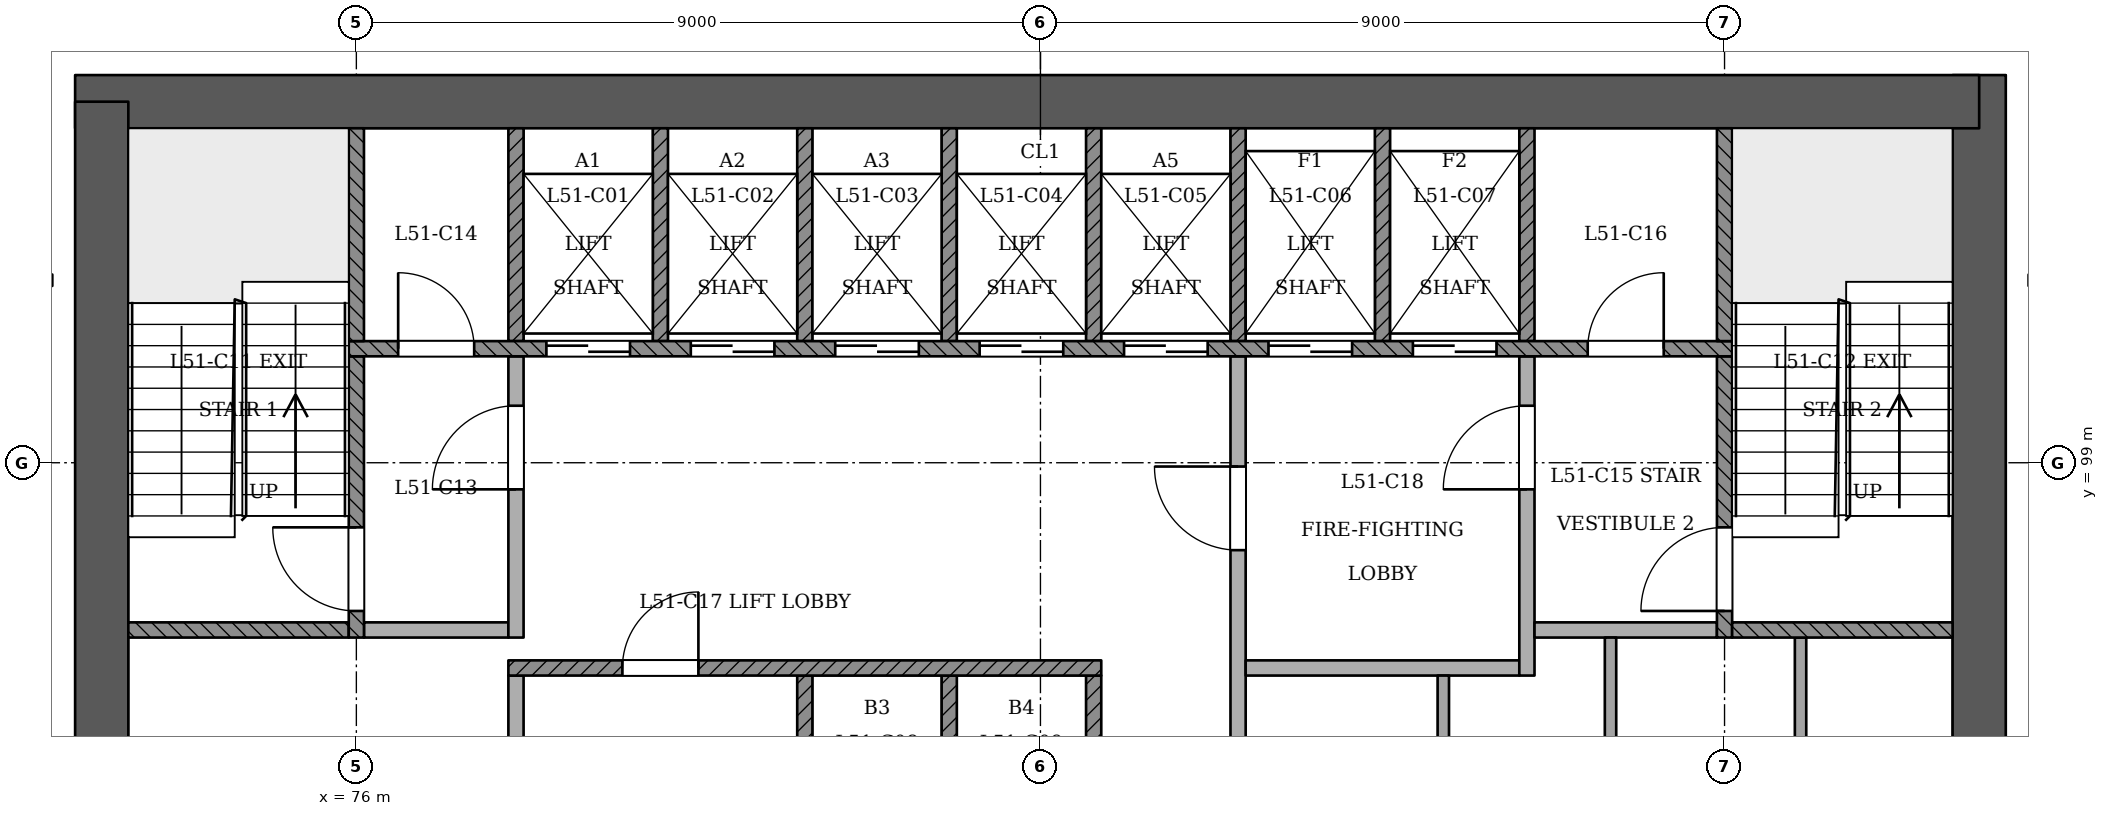
"""IFC4 building model, lengths in metres.
Left out: names, types, materials, properties, quantities, classifications, styles, units other than length and angle.
Written with IfcOpenShell. Run it as: python <this file> out.ifc"""

import sys

from ifc_helpers import new_model, si_unit, direction, frame, frame_2d, origin, place, context, subcontext, project, spatial, rectangle, extrude, element, fill, save


model = new_model("IFC4")
c1 = context("Model", 3, precision=1e-05, world=origin(), true_north=direction((0.0, 1.0)))
c2 = subcontext(c1, "Body", "Model", "MODEL_VIEW")
j1 = project(units=[si_unit("LENGTHUNIT", "METRE"), si_unit("PLANEANGLEUNIT", "RADIAN")], contexts=[c1])
p1 = place(None, origin())
s1 = spatial("IfcSite", under=j1, at=p1, CompositionType="ELEMENT")
p2 = place(p1, origin())
s2 = spatial("IfcBuilding", under=s1, at=p2, CompositionType="ELEMENT")
p3 = place(p2, frame((0.0, 0.0, 198.0)))
s3 = spatial("IfcBuildingStorey", under=s2, at=p3, CompositionType="ELEMENT", Elevation=198.0)
p4 = place(p3, frame((97.35, 93.05, 0.0), z_axis=(0.0, 0.0, 1.0), x_axis=(0.0, 1.0, 0.0)))
e1 = element("IfcWall", 1, at=p4, inside=s3, PredefinedType="SHEAR", context=c2, shape_type="SweptSolid", body=[
    extrude(rectangle(XDim=11.05, YDim=0.7, at=frame_2d((5.525, 0.0))), origin(), (0.0, 0.0, 1.0), 3.6),
])
p5 = place(p3, frame((97.35, 103.75, 0.0), z_axis=(0.0, 0.0, 1.0), x_axis=(-1.0, 0.0, 0.0)))
e2 = element("IfcWall", 2, at=p5, inside=s3, PredefinedType="SHEAR", context=c2, shape_type="SweptSolid", body=[
    extrude(rectangle(XDim=25.05, YDim=0.7, at=frame_2d((12.525, 0.0))), origin(), (0.0, 0.0, 1.0), 3.6),
])
p6 = place(p3, frame((72.65, 103.75, 0.0), z_axis=(0.0, 0.0, 1.0), x_axis=(0.0, -1.0, 0.0)))
e3 = element("IfcWall", 3, at=p6, inside=s3, PredefinedType="SHEAR", context=c2, shape_type="SweptSolid", body=[
    extrude(rectangle(XDim=11.05, YDim=0.7, at=frame_2d((5.525, 0.0))), origin(), (0.0, 0.0, 1.0), 3.6),
])
p7 = place(p3, frame((78.1, 93.4, 0.0), z_axis=(0.0, 0.0, 1.0), x_axis=(0.0, 1.0, 0.0)))
e4 = element("IfcWall", 4, at=p7, inside=s3, PredefinedType="PARTITIONING", context=c2, shape_type="SweptSolid", body=[
    extrude(rectangle(XDim=2.8, YDim=0.2, at=frame_2d((1.4, 0.0))), origin(), (0.0, 0.0, 1.0), 3.15),
])
for number, where, z_axis, x_axis in (
    (5, (81.9, 93.4, 0.0), (0.0, 0.0, 1.0), (0.0, 1.0, 0.0)),
    (6, (83.8, 93.4, 0.0), (0.0, 0.0, 1.0), (0.0, 1.0, 0.0)),
    (7, (85.7, 93.4, 0.0), (0.0, 0.0, 1.0), (0.0, 1.0, 0.0)),
):
    element("IfcWall", number, at=place(p3, frame(where, z_axis=z_axis, x_axis=x_axis)), inside=s3, PredefinedType="SOLIDWALL", context=c2, shape_type="SweptSolid", body=[
        extrude(rectangle(XDim=2.8, YDim=0.2, at=frame_2d((1.4, 0.0))), origin(), (0.0, 0.0, 1.0), 3.15),
    ])
p8 = place(p3, frame((87.6, 93.4, 0.0), z_axis=(0.0, 0.0, 1.0), x_axis=(0.0, 1.0, 0.0)))
e8 = element("IfcWall", 8, at=p8, inside=s3, PredefinedType="PARTITIONING", context=c2, shape_type="SweptSolid", body=[
    extrude(rectangle(XDim=7.0, YDim=0.2, at=frame_2d((3.5, 0.0))), origin(), (0.0, 0.0, 1.0), 3.15),
])
p9 = place(p8, frame((4.45, 0.0, 0.0)))
e9 = element("IfcOpeningElement", 9, at=p9, cuts=e8, PredefinedType="OPENING", context=c2, shape_type="SweptSolid", body=[
    extrude(rectangle(XDim=1.1, YDim=2.1, at=frame_2d((0.55, 1.05))), frame((0.0, 0.11, 0.0), z_axis=(0.0, -1.0, 0.0), x_axis=(1.0, 0.0, 0.0)), (0.0, 0.0, 1.0), 0.221),
])
p10 = place(p3, frame((90.3, 93.4, 0.0), z_axis=(0.0, 0.0, 1.0), x_axis=(0.0, 1.0, 0.0)))
e10 = element("IfcWall", 10, at=p10, inside=s3, PredefinedType="PARTITIONING", context=c2, shape_type="SweptSolid", body=[
    extrude(rectangle(XDim=2.8, YDim=0.15, at=frame_2d((1.4, 0.0))), origin(), (0.0, 0.0, 1.0), 3.15),
])
for number, where, z_axis, x_axis in (
    (11, (92.5, 93.4, 0.0), (0.0, 0.0, 1.0), (0.0, 1.0, 0.0)),
    (12, (95.0, 93.4, 0.0), (0.0, 0.0, 1.0), (0.0, 1.0, 0.0)),
):
    element("IfcWall", number, at=place(p3, frame(where, z_axis=z_axis, x_axis=x_axis)), inside=s3, PredefinedType="PARTITIONING", context=c2, shape_type="SweptSolid", body=[
        extrude(rectangle(XDim=3.3, YDim=0.15, at=frame_2d((1.65, 0.0))), origin(), (0.0, 0.0, 1.0), 3.15),
    ])
p11 = place(p3, frame((78.0, 96.3, 0.0), z_axis=(0.0, 0.0, 1.0), x_axis=(1.0, 0.0, 0.0)))
e13 = element("IfcWall", 13, at=p11, inside=s3, PredefinedType="SOLIDWALL", context=c2, shape_type="SweptSolid", body=[
    extrude(rectangle(XDim=7.8, YDim=0.2, at=frame_2d((3.9, 0.0))), origin(), (0.0, 0.0, 1.0), 3.15),
])
p12 = place(p11, frame((1.5, 0.0, 0.0)))
e14 = element("IfcOpeningElement", 14, at=p12, cuts=e13, PredefinedType="OPENING", context=c2, shape_type="SweptSolid", body=[
    extrude(rectangle(XDim=1.0, YDim=2.1, at=frame_2d((0.5, 1.05))), frame((0.0, 0.11, 0.0), z_axis=(0.0, -1.0, 0.0), x_axis=(1.0, 0.0, 0.0)), (0.0, 0.0, 1.0), 0.221),
])
p13 = place(p3, frame((87.7, 96.3, 0.0), z_axis=(0.0, 0.0, 1.0), x_axis=(1.0, 0.0, 0.0)))
e15 = element("IfcWall", 15, at=p13, inside=s3, PredefinedType="PARTITIONING", context=c2, shape_type="SweptSolid", body=[
    extrude(rectangle(XDim=3.6, YDim=0.2, at=frame_2d((1.8, 0.0))), origin(), (0.0, 0.0, 1.0), 3.15),
])
p14 = place(p3, frame((91.4, 96.2, 0.0), z_axis=(0.0, 0.0, 1.0), x_axis=(0.0, 1.0, 0.0)))
e16 = element("IfcWall", 16, at=p14, inside=s3, PredefinedType="PARTITIONING", context=c2, shape_type="SweptSolid", body=[
    extrude(rectangle(XDim=4.2, YDim=0.2, at=frame_2d((2.1, 0.0))), origin(), (0.0, 0.0, 1.0), 3.15),
])
p15 = place(p14, frame((2.45, 0.0, 0.0)))
e17 = element("IfcOpeningElement", 17, at=p15, cuts=e16, PredefinedType="OPENING", context=c2, shape_type="SweptSolid", body=[
    extrude(rectangle(XDim=1.1, YDim=2.1, at=frame_2d((0.55, 1.05))), frame((0.0, 0.11, 0.0), z_axis=(0.0, -1.0, 0.0), x_axis=(1.0, 0.0, 0.0)), (0.0, 0.0, 1.0), 0.221),
])
p16 = place(p3, frame((73.0, 96.8, 0.0), z_axis=(0.0, 0.0, 1.0), x_axis=(1.0, 0.0, 0.0)))
e18 = element("IfcWall", 18, at=p16, inside=s3, PredefinedType="SOLIDWALL", context=c2, shape_type="SweptSolid", body=[
    extrude(rectangle(XDim=2.9, YDim=0.2, at=frame_2d((1.45, 0.0))), origin(), (0.0, 0.0, 1.0), 3.15),
])
p17 = place(p3, frame((76.0, 96.7, 0.0), z_axis=(0.0, 0.0, 1.0), x_axis=(0.0, 1.0, 0.0)))
e19 = element("IfcWall", 19, at=p17, inside=s3, PredefinedType="SOLIDWALL", context=c2, shape_type="SweptSolid", body=[
    extrude(rectangle(XDim=3.7, YDim=0.2, at=frame_2d((1.85, 0.0))), origin(), (0.0, 0.0, 1.0), 3.15),
])
p18 = place(p17, frame((0.35, 0.0, 0.0)))
e20 = element("IfcOpeningElement", 20, at=p18, cuts=e19, PredefinedType="OPENING", context=c2, shape_type="SweptSolid", body=[
    extrude(rectangle(XDim=1.1, YDim=2.1, at=frame_2d((0.55, 1.05))), frame((0.0, 0.11, 0.0), z_axis=(0.0, -1.0, 0.0), x_axis=(1.0, 0.0, 0.0)), (0.0, 0.0, 1.0), 0.221),
])
p19 = place(p3, frame((76.1, 96.8, 0.0), z_axis=(0.0, 0.0, 1.0), x_axis=(1.0, 0.0, 0.0)))
e21 = element("IfcWall", 21, at=p19, inside=s3, PredefinedType="PARTITIONING", context=c2, shape_type="SweptSolid", body=[
    extrude(rectangle(XDim=1.9, YDim=0.2, at=frame_2d((0.95, 0.0))), origin(), (0.0, 0.0, 1.0), 3.15),
])
p20 = place(p3, frame((78.1, 96.7, 0.0), z_axis=(0.0, 0.0, 1.0), x_axis=(0.0, 1.0, 0.0)))
e22 = element("IfcWall", 22, at=p20, inside=s3, PredefinedType="PARTITIONING", context=c2, shape_type="SweptSolid", body=[
    extrude(rectangle(XDim=3.7, YDim=0.2, at=frame_2d((1.85, 0.0))), origin(), (0.0, 0.0, 1.0), 3.15),
])
p21 = place(p20, frame((1.95, 0.0, 0.0)))
e23 = element("IfcOpeningElement", 23, at=p21, cuts=e22, PredefinedType="OPENING", context=c2, shape_type="SweptSolid", body=[
    extrude(rectangle(XDim=1.1, YDim=2.1, at=frame_2d((0.55, 1.05))), frame((0.0, 0.11, 0.0), z_axis=(0.0, -1.0, 0.0), x_axis=(1.0, 0.0, 0.0)), (0.0, 0.0, 1.0), 0.221),
])
p22 = place(p3, frame((91.5, 96.8, 0.0), z_axis=(0.0, 0.0, 1.0), x_axis=(1.0, 0.0, 0.0)))
e24 = element("IfcWall", 24, at=p22, inside=s3, PredefinedType="PARTITIONING", context=c2, shape_type="SweptSolid", body=[
    extrude(rectangle(XDim=2.4, YDim=0.2, at=frame_2d((1.2, 0.0))), origin(), (0.0, 0.0, 1.0), 3.15),
])
p23 = place(p3, frame((94.0, 96.7, 0.0), z_axis=(0.0, 0.0, 1.0), x_axis=(0.0, 1.0, 0.0)))
e25 = element("IfcWall", 25, at=p23, inside=s3, PredefinedType="SOLIDWALL", context=c2, shape_type="SweptSolid", body=[
    extrude(rectangle(XDim=3.7, YDim=0.2, at=frame_2d((1.85, 0.0))), origin(), (0.0, 0.0, 1.0), 3.15),
])
p24 = place(p23, frame((0.35, 0.0, 0.0)))
e26 = element("IfcOpeningElement", 26, at=p24, cuts=e25, PredefinedType="OPENING", context=c2, shape_type="SweptSolid", body=[
    extrude(rectangle(XDim=1.1, YDim=2.1, at=frame_2d((0.55, 1.05))), frame((0.0, 0.11, 0.0), z_axis=(0.0, -1.0, 0.0), x_axis=(1.0, 0.0, 0.0)), (0.0, 0.0, 1.0), 0.221),
])
p25 = place(p3, frame((94.1, 96.8, 0.0), z_axis=(0.0, 0.0, 1.0), x_axis=(1.0, 0.0, 0.0)))
e27 = element("IfcWall", 27, at=p25, inside=s3, PredefinedType="SOLIDWALL", context=c2, shape_type="SweptSolid", body=[
    extrude(rectangle(XDim=2.9, YDim=0.2, at=frame_2d((1.45, 0.0))), origin(), (0.0, 0.0, 1.0), 3.15),
])
p26 = place(p3, frame((75.9, 100.5, 0.0), z_axis=(0.0, 0.0, 1.0), x_axis=(1.0, 0.0, 0.0)))
e28 = element("IfcWall", 28, at=p26, inside=s3, PredefinedType="SOLIDWALL", context=c2, shape_type="SweptSolid", body=[
    extrude(rectangle(XDim=18.2, YDim=0.2, at=frame_2d((9.1, 0.0))), origin(), (0.0, 0.0, 1.0), 3.15),
])
p27 = place(p26, frame((2.6, 0.0, 0.0)))
e29 = element("IfcOpeningElement", 29, at=p27, cuts=e28, PredefinedType="OPENING", context=c2, shape_type="SweptSolid", body=[
    extrude(rectangle(XDim=1.1, YDim=2.1, at=frame_2d((0.55, 1.05))), frame((0.0, 0.11, 0.0), z_axis=(0.0, -1.0, 0.0), x_axis=(1.0, 0.0, 0.0)), (0.0, 0.0, 1.0), 0.221),
])
p28 = place(p26, frame((4.5, 0.0, 0.0)))
e30 = element("IfcOpeningElement", 30, at=p28, cuts=e28, PredefinedType="OPENING", context=c2, shape_type="SweptSolid", body=[
    extrude(rectangle(XDim=1.1, YDim=2.1, at=frame_2d((0.55, 1.05))), frame((0.0, 0.11, 0.0), z_axis=(0.0, -1.0, 0.0), x_axis=(1.0, 0.0, 0.0)), (0.0, 0.0, 1.0), 0.221),
])
p29 = place(p26, frame((6.4, 0.0, 0.0)))
e31 = element("IfcOpeningElement", 31, at=p29, cuts=e28, PredefinedType="OPENING", context=c2, shape_type="SweptSolid", body=[
    extrude(rectangle(XDim=1.1, YDim=2.1, at=frame_2d((0.55, 1.05))), frame((0.0, 0.11, 0.0), z_axis=(0.0, -1.0, 0.0), x_axis=(1.0, 0.0, 0.0)), (0.0, 0.0, 1.0), 0.221),
])
p30 = place(p26, frame((8.3, 0.0, 0.0)))
e32 = element("IfcOpeningElement", 32, at=p30, cuts=e28, PredefinedType="OPENING", context=c2, shape_type="SweptSolid", body=[
    extrude(rectangle(XDim=1.1, YDim=2.1, at=frame_2d((0.55, 1.05))), frame((0.0, 0.11, 0.0), z_axis=(0.0, -1.0, 0.0), x_axis=(1.0, 0.0, 0.0)), (0.0, 0.0, 1.0), 0.221),
])
p31 = place(p26, frame((10.2, 0.0, 0.0)))
e33 = element("IfcOpeningElement", 33, at=p31, cuts=e28, PredefinedType="OPENING", context=c2, shape_type="SweptSolid", body=[
    extrude(rectangle(XDim=1.1, YDim=2.1, at=frame_2d((0.55, 1.05))), frame((0.0, 0.11, 0.0), z_axis=(0.0, -1.0, 0.0), x_axis=(1.0, 0.0, 0.0)), (0.0, 0.0, 1.0), 0.221),
])
p32 = place(p26, frame((12.1, 0.0, 0.0)))
e34 = element("IfcOpeningElement", 34, at=p32, cuts=e28, PredefinedType="OPENING", context=c2, shape_type="SweptSolid", body=[
    extrude(rectangle(XDim=1.1, YDim=2.1, at=frame_2d((0.55, 1.05))), frame((0.0, 0.11, 0.0), z_axis=(0.0, -1.0, 0.0), x_axis=(1.0, 0.0, 0.0)), (0.0, 0.0, 1.0), 0.221),
])
p33 = place(p26, frame((14.0, 0.0, 0.0)))
e35 = element("IfcOpeningElement", 35, at=p33, cuts=e28, PredefinedType="OPENING", context=c2, shape_type="SweptSolid", body=[
    extrude(rectangle(XDim=1.1, YDim=2.1, at=frame_2d((0.55, 1.05))), frame((0.0, 0.11, 0.0), z_axis=(0.0, -1.0, 0.0), x_axis=(1.0, 0.0, 0.0)), (0.0, 0.0, 1.0), 0.221),
])
p34 = place(p26, frame((0.65, 0.0, 0.0)))
e36 = element("IfcOpeningElement", 36, at=p34, cuts=e28, PredefinedType="OPENING", context=c2, shape_type="SweptSolid", body=[
    extrude(rectangle(XDim=1.0, YDim=2.1, at=frame_2d((0.5, 1.05))), frame((0.0, 0.11, 0.0), z_axis=(0.0, -1.0, 0.0), x_axis=(1.0, 0.0, 0.0)), (0.0, 0.0, 1.0), 0.221),
])
p35 = place(p26, frame((16.3, 0.0, 0.0)))
e37 = element("IfcOpeningElement", 37, at=p35, cuts=e28, PredefinedType="OPENING", context=c2, shape_type="SweptSolid", body=[
    extrude(rectangle(XDim=1.0, YDim=2.1, at=frame_2d((0.5, 1.05))), frame((0.0, 0.11, 0.0), z_axis=(0.0, -1.0, 0.0), x_axis=(1.0, 0.0, 0.0)), (0.0, 0.0, 1.0), 0.221),
])
for number, where, z_axis, x_axis in (
    (38, (76.0, 100.6, 0.0), (0.0, 0.0, 1.0), (0.0, 1.0, 0.0)),
    (39, (78.1, 100.6, 0.0), (0.0, 0.0, 1.0), (0.0, 1.0, 0.0)),
    (40, (80.0, 100.6, 0.0), (0.0, 0.0, 1.0), (0.0, 1.0, 0.0)),
    (41, (81.9, 100.6, 0.0), (0.0, 0.0, 1.0), (0.0, 1.0, 0.0)),
    (42, (83.8, 100.6, 0.0), (0.0, 0.0, 1.0), (0.0, 1.0, 0.0)),
    (43, (85.7, 100.6, 0.0), (0.0, 0.0, 1.0), (0.0, 1.0, 0.0)),
    (44, (87.6, 100.6, 0.0), (0.0, 0.0, 1.0), (0.0, 1.0, 0.0)),
    (45, (89.5, 100.6, 0.0), (0.0, 0.0, 1.0), (0.0, 1.0, 0.0)),
    (46, (91.4, 100.6, 0.0), (0.0, 0.0, 1.0), (0.0, 1.0, 0.0)),
    (47, (94.0, 100.6, 0.0), (0.0, 0.0, 1.0), (0.0, 1.0, 0.0)),
):
    element("IfcWall", number, at=place(p3, frame(where, z_axis=z_axis, x_axis=x_axis)), inside=s3, PredefinedType="SOLIDWALL", context=c2, shape_type="SweptSolid", body=[
        extrude(rectangle(XDim=2.8, YDim=0.2, at=frame_2d((1.4, 0.0))), origin(), (0.0, 0.0, 1.0), 3.15),
    ])
p36 = place(p27, origin())
e48 = element("IfcDoor", 48, at=p36, inside=s3, OperationType="SLIDING_TO_RIGHT", PredefinedType="NOTDEFINED", context=c2, shape_type="SweptSolid", body=[
    extrude(rectangle(XDim=1.1, YDim=2.1, at=frame_2d((0.55, 1.05))), frame((0.0, 0.025, 0.0), z_axis=(0.0, -1.0, 0.0), x_axis=(1.0, 0.0, 0.0)), (0.0, 0.0, 1.0), 0.05),
])
fill(e29, e48)
p37 = place(p28, origin())
e49 = element("IfcDoor", 49, at=p37, inside=s3, OperationType="SLIDING_TO_LEFT", PredefinedType="NOTDEFINED", context=c2, shape_type="SweptSolid", body=[
    extrude(rectangle(XDim=1.1, YDim=2.1, at=frame_2d((0.55, 1.05))), frame((0.0, 0.025, 0.0), z_axis=(0.0, -1.0, 0.0), x_axis=(1.0, 0.0, 0.0)), (0.0, 0.0, 1.0), 0.05),
])
fill(e30, e49)
p38 = place(p29, origin())
e50 = element("IfcDoor", 50, at=p38, inside=s3, OperationType="SLIDING_TO_RIGHT", PredefinedType="NOTDEFINED", context=c2, shape_type="SweptSolid", body=[
    extrude(rectangle(XDim=1.1, YDim=2.1, at=frame_2d((0.55, 1.05))), frame((0.0, 0.025, 0.0), z_axis=(0.0, -1.0, 0.0), x_axis=(1.0, 0.0, 0.0)), (0.0, 0.0, 1.0), 0.05),
])
fill(e31, e50)
p39 = place(p30, origin())
e51 = element("IfcDoor", 51, at=p39, inside=s3, OperationType="SLIDING_TO_LEFT", PredefinedType="NOTDEFINED", context=c2, shape_type="SweptSolid", body=[
    extrude(rectangle(XDim=1.1, YDim=2.1, at=frame_2d((0.55, 1.05))), frame((0.0, 0.025, 0.0), z_axis=(0.0, -1.0, 0.0), x_axis=(1.0, 0.0, 0.0)), (0.0, 0.0, 1.0), 0.05),
])
fill(e32, e51)
p40 = place(p31, origin())
e52 = element("IfcDoor", 52, at=p40, inside=s3, OperationType="SLIDING_TO_RIGHT", PredefinedType="NOTDEFINED", context=c2, shape_type="SweptSolid", body=[
    extrude(rectangle(XDim=1.1, YDim=2.1, at=frame_2d((0.55, 1.05))), frame((0.0, 0.025, 0.0), z_axis=(0.0, -1.0, 0.0), x_axis=(1.0, 0.0, 0.0)), (0.0, 0.0, 1.0), 0.05),
])
fill(e33, e52)
p41 = place(p32, origin())
e53 = element("IfcDoor", 53, at=p41, inside=s3, OperationType="SLIDING_TO_RIGHT", PredefinedType="NOTDEFINED", context=c2, shape_type="SweptSolid", body=[
    extrude(rectangle(XDim=1.1, YDim=2.1, at=frame_2d((0.55, 1.05))), frame((0.0, 0.025, 0.0), z_axis=(0.0, -1.0, 0.0), x_axis=(1.0, 0.0, 0.0)), (0.0, 0.0, 1.0), 0.05),
])
fill(e34, e53)
p42 = place(p33, origin())
e54 = element("IfcDoor", 54, at=p42, inside=s3, OperationType="SLIDING_TO_LEFT", PredefinedType="NOTDEFINED", context=c2, shape_type="SweptSolid", body=[
    extrude(rectangle(XDim=1.1, YDim=2.1, at=frame_2d((0.55, 1.05))), frame((0.0, 0.025, 0.0), z_axis=(0.0, -1.0, 0.0), x_axis=(1.0, 0.0, 0.0)), (0.0, 0.0, 1.0), 0.05),
])
fill(e35, e54)
p43 = place(p18, origin())
e55 = element("IfcDoor", 55, at=p43, inside=s3, OperationType="SINGLE_SWING_RIGHT", PredefinedType="NOTDEFINED", context=c2, shape_type="SweptSolid", body=[
    extrude(rectangle(XDim=1.1, YDim=2.1, at=frame_2d((0.55, 1.05))), frame((0.0, 0.025, 0.0), z_axis=(0.0, -1.0, 0.0), x_axis=(1.0, 0.0, 0.0)), (0.0, 0.0, 1.0), 0.05),
])
fill(e20, e55)
p44 = place(p24, origin())
e56 = element("IfcDoor", 56, at=p44, inside=s3, OperationType="SINGLE_SWING_LEFT", PredefinedType="NOTDEFINED", context=c2, shape_type="SweptSolid", body=[
    extrude(rectangle(XDim=1.1, YDim=2.1, at=frame_2d((0.55, 1.05))), frame((0.0, 0.025, 0.0), z_axis=(0.0, -1.0, 0.0), x_axis=(1.0, 0.0, 0.0)), (0.0, 0.0, 1.0), 0.05),
])
fill(e26, e56)
p45 = place(p21, origin())
e57 = element("IfcDoor", 57, at=p45, inside=s3, OperationType="SINGLE_SWING_LEFT", PredefinedType="NOTDEFINED", context=c2, shape_type="SweptSolid", body=[
    extrude(rectangle(XDim=1.1, YDim=2.1, at=frame_2d((0.55, 1.05))), frame((0.0, 0.025, 0.0), z_axis=(0.0, -1.0, 0.0), x_axis=(1.0, 0.0, 0.0)), (0.0, 0.0, 1.0), 0.05),
])
fill(e23, e57)
p46 = place(p9, origin())
e58 = element("IfcDoor", 58, at=p46, inside=s3, OperationType="SINGLE_SWING_RIGHT", PredefinedType="NOTDEFINED", context=c2, shape_type="SweptSolid", body=[
    extrude(rectangle(XDim=1.1, YDim=2.1, at=frame_2d((0.55, 1.05))), frame((0.0, 0.025, 0.0), z_axis=(0.0, -1.0, 0.0), x_axis=(1.0, 0.0, 0.0)), (0.0, 0.0, 1.0), 0.05),
])
fill(e9, e58)
p47 = place(p15, origin())
e59 = element("IfcDoor", 59, at=p47, inside=s3, OperationType="SINGLE_SWING_LEFT", PredefinedType="NOTDEFINED", context=c2, shape_type="SweptSolid", body=[
    extrude(rectangle(XDim=1.1, YDim=2.1, at=frame_2d((0.55, 1.05))), frame((0.0, 0.025, 0.0), z_axis=(0.0, -1.0, 0.0), x_axis=(1.0, 0.0, 0.0)), (0.0, 0.0, 1.0), 0.05),
])
fill(e17, e59)
p48 = place(p34, origin())
e60 = element("IfcDoor", 60, at=p48, inside=s3, OperationType="SINGLE_SWING_LEFT", PredefinedType="NOTDEFINED", context=c2, shape_type="SweptSolid", body=[
    extrude(rectangle(XDim=1.0, YDim=2.1, at=frame_2d((0.5, 1.05))), frame((0.0, 0.025, 0.0), z_axis=(0.0, -1.0, 0.0), x_axis=(1.0, 0.0, 0.0)), (0.0, 0.0, 1.0), 0.05),
])
fill(e36, e60)
p49 = place(p35, origin())
e61 = element("IfcDoor", 61, at=p49, inside=s3, OperationType="SINGLE_SWING_RIGHT", PredefinedType="NOTDEFINED", context=c2, shape_type="SweptSolid", body=[
    extrude(rectangle(XDim=1.0, YDim=2.1, at=frame_2d((0.5, 1.05))), frame((0.0, 0.025, 0.0), z_axis=(0.0, -1.0, 0.0), x_axis=(1.0, 0.0, 0.0)), (0.0, 0.0, 1.0), 0.05),
])
fill(e37, e61)
p50 = place(p12, origin())
e62 = element("IfcDoor", 62, at=p50, inside=s3, OperationType="SINGLE_SWING_RIGHT", PredefinedType="NOTDEFINED", context=c2, shape_type="SweptSolid", body=[
    extrude(rectangle(XDim=1.0, YDim=2.1, at=frame_2d((0.5, 1.05))), frame((0.0, 0.025, 0.0), z_axis=(0.0, -1.0, 0.0), x_axis=(1.0, 0.0, 0.0)), (0.0, 0.0, 1.0), 0.05),
])
fill(e14, e62)
save(model, sys.argv[1])
